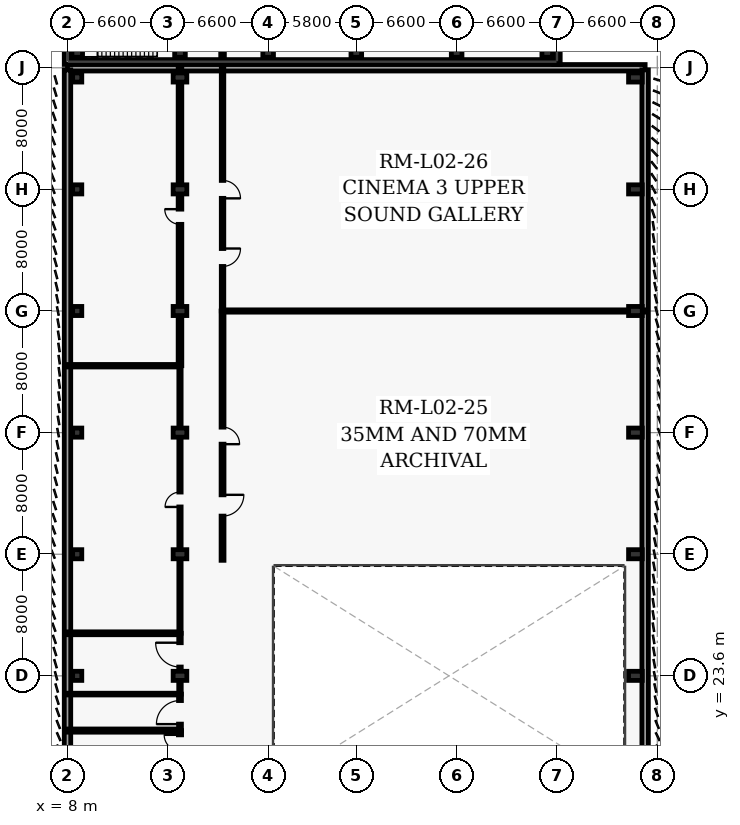
"""IFC4 building model, lengths in metres.
Left out: names, types, materials, properties, quantities, classifications, styles, units other than length and angle.
Written with IfcOpenShell. Run it as: python <this file> out.ifc"""

import sys

from ifc_helpers import new_model, si_unit, direction, frame, frame_2d, origin, origin_2d, place, context, subcontext, project, spatial, rectangle, extrude, element, fill, save


model = new_model("IFC4")
c1 = context("Model", 3, precision=1e-05, world=origin(), true_north=direction((0.0, 1.0)))
c2 = subcontext(c1, "Body", "Model", "MODEL_VIEW")
j1 = project(units=[si_unit("LENGTHUNIT", "METRE"), si_unit("PLANEANGLEUNIT", "RADIAN")], contexts=[c1])
p1 = place(None, origin())
s1 = spatial("IfcSite", under=j1, at=p1, CompositionType="ELEMENT")
p2 = place(p1, origin())
s2 = spatial("IfcBuilding", under=s1, at=p2, CompositionType="ELEMENT")
p3 = place(p2, frame((0.0, 0.0, 10.2)))
s3 = spatial("IfcBuildingStorey", under=s2, at=p3, CompositionType="ELEMENT", Elevation=10.2)
for number, where, z_axis, x_axis in (
    (1, (8.64, 23.6, 0.0), (0.0, 0.0, 1.0), (1.0, 0.0, 0.0)),
    (2, (8.64, 31.6, 0.0), (0.0, 0.0, 1.0), (1.0, 0.0, 0.0)),
    (3, (8.64, 39.6, 0.0), (0.0, 0.0, 1.0), (1.0, 0.0, 0.0)),
    (4, (8.64, 47.6, 0.0), (0.0, 0.0, 1.0), (1.0, 0.0, 0.0)),
    (5, (8.64, 55.6, 0.0), (0.0, 0.0, 1.0), (1.0, 0.0, 0.0)),
    (6, (8.64, 62.96, 0.0), (0.0, 0.0, 1.0), (1.0, 0.0, 0.0)),
):
    element("IfcColumn", number, at=place(p3, frame(where, z_axis=z_axis, x_axis=x_axis)), inside=s3, PredefinedType="COLUMN", context=c2, shape_type="SweptSolid", body=[
        extrude(rectangle(XDim=0.6, YDim=0.6, at=origin_2d()), origin(), (0.0, 0.0, 1.0), 5.4),
    ])
for number, where, z_axis, x_axis in (
    (7, (15.4, 23.6, 0.0), (0.0, 0.0, 1.0), (1.0, 0.0, 0.0)),
    (8, (15.4, 31.6, 0.0), (0.0, 0.0, 1.0), (1.0, 0.0, 0.0)),
    (9, (15.4, 39.6, 0.0), (0.0, 0.0, 1.0), (1.0, 0.0, 0.0)),
    (10, (15.4, 47.6, 0.0), (0.0, 0.0, 1.0), (1.0, 0.0, 0.0)),
    (11, (15.4, 55.6, 0.0), (0.0, 0.0, 1.0), (1.0, 0.0, 0.0)),
    (12, (15.4, 62.96, 0.0), (0.0, 0.0, 1.0), (1.0, 0.0, 0.0)),
    (13, (45.36, 23.6, 0.0), (0.0, 0.0, 1.0), (1.0, 0.0, 0.0)),
    (14, (45.36, 31.6, 0.0), (0.0, 0.0, 1.0), (1.0, 0.0, 0.0)),
    (15, (45.36, 39.6, 0.0), (0.0, 0.0, 1.0), (1.0, 0.0, 0.0)),
    (16, (45.36, 47.6, 0.0), (0.0, 0.0, 1.0), (1.0, 0.0, 0.0)),
    (17, (45.36, 55.6, 0.0), (0.0, 0.0, 1.0), (1.0, 0.0, 0.0)),
    (18, (45.36, 62.96, 0.0), (0.0, 0.0, 1.0), (1.0, 0.0, 0.0)),
):
    element("IfcColumn", number, at=place(p3, frame(where, z_axis=z_axis, x_axis=x_axis)), inside=s3, PredefinedType="COLUMN", context=c2, shape_type="SweptSolid", body=[
        extrude(rectangle(XDim=0.6, YDim=0.9, at=origin_2d()), origin(), (0.0, 0.0, 1.0), 5.4),
    ])
for number, where, z_axis, x_axis in (
    (19, (8.64, 64.64, 0.0), (0.0, 0.0, 1.0), (1.0, 0.0, 0.0)),
    (20, (15.4, 64.64, 0.0), (0.0, 0.0, 1.0), (1.0, 0.0, 0.0)),
    (21, (21.2, 64.64, 0.0), (0.0, 0.0, 1.0), (1.0, 0.0, 0.0)),
    (22, (27.0, 64.64, 0.0), (0.0, 0.0, 1.0), (1.0, 0.0, 0.0)),
    (23, (33.6, 64.64, 0.0), (0.0, 0.0, 1.0), (1.0, 0.0, 0.0)),
    (24, (39.56, 64.64, 0.0), (0.0, 0.0, 1.0), (1.0, 0.0, 0.0)),
):
    element("IfcColumn", number, at=place(p3, frame(where, z_axis=z_axis, x_axis=x_axis)), inside=s3, PredefinedType="COLUMN", context=c2, shape_type="SweptSolid", body=[
        extrude(rectangle(XDim=0.7, YDim=0.7, at=origin_2d()), origin(), (0.0, 0.0, 1.0), 5.4),
    ])
p4 = place(p3, frame((8.0, 63.6, 0.0), z_axis=(0.0, 0.0, 1.0), x_axis=(1.0, 0.0, 0.0)))
e25 = element("IfcWall", 25, at=p4, inside=s3, PredefinedType="SOLIDWALL", context=c2, shape_type="SweptSolid", body=[
    extrude(rectangle(XDim=38.0, YDim=0.425, at=frame_2d((19.0, 0.0))), origin(), (0.0, 0.0, 1.0), 5.16),
])
for number, where, z_axis, x_axis in (
    (26, (46.0, 63.46, 0.0), (0.0, 0.0, 1.0), (0.0, -1.0, 0.0)),
    (27, (8.0, 7.74, 0.0), (0.0, 0.0, 1.0), (0.0, 1.0, 0.0)),
):
    element("IfcWall", number, at=place(p3, frame(where, z_axis=z_axis, x_axis=x_axis)), inside=s3, PredefinedType="SOLIDWALL", context=c2, shape_type="SweptSolid", body=[
        extrude(rectangle(XDim=55.72, YDim=0.425, at=frame_2d((27.86, 0.0))), origin(), (0.0, 0.0, 1.0), 5.16),
    ])
p5 = place(p3, frame((40.2, 67.06, 0.0), z_axis=(0.0, 0.0, 1.0), x_axis=(0.0, -1.0, 0.0)))
e28 = element("IfcWall", 28, at=p5, inside=s3, PredefinedType="SOLIDWALL", context=c2, shape_type="SweptSolid", body=[
    extrude(rectangle(XDim=3.242, YDim=0.425, at=frame_2d((1.621, 0.0))), origin(), (0.0, 0.0, 1.0), 5.1),
])
p6 = place(p3, frame((40.2, 64.0, 0.0), z_axis=(0.0, 0.0, 1.0), x_axis=(-1.0, 0.0, 0.0)))
e29 = element("IfcWall", 29, at=p6, inside=s3, PredefinedType="SOLIDWALL", context=c2, shape_type="SweptSolid", body=[
    extrude(rectangle(XDim=32.2, YDim=0.275, at=frame_2d((16.1, 0.0))), origin(), (0.0, 0.0, 1.0), 3.7),
])
p7 = place(p3, frame((8.0, 63.818, 0.0), z_axis=(0.0, 0.0, 1.0), x_axis=(0.0, 1.0, 0.0)))
e30 = element("IfcWall", 30, at=p7, inside=s3, PredefinedType="SOLIDWALL", context=c2, shape_type="SweptSolid", body=[
    extrude(rectangle(XDim=8.042, YDim=0.425, at=frame_2d((4.021, 0.0))), origin(), (0.0, 0.0, 1.0), 5.1),
])
p8 = place(p3, frame((15.4, 64.145, 0.0), z_axis=(0.0, 0.0, 1.0), x_axis=(0.0, 1.0, 0.0)))
e31 = element("IfcWall", 31, at=p8, inside=s3, PredefinedType="SHEAR", context=c2, shape_type="SweptSolid", body=[
    extrude(rectangle(XDim=7.103, YDim=0.29, at=frame_2d((3.552, 0.0))), origin(), (0.0, 0.0, 1.0), 5.1),
])
p9 = place(p8, frame((1.105, 0.0, 0.0)))
e32 = element("IfcOpeningElement", 32, at=p9, cuts=e31, PredefinedType="OPENING", context=c2, shape_type="SweptSolid", body=[
    extrude(rectangle(XDim=1.1, YDim=2.15, at=frame_2d((0.55, 1.075))), frame((0.0, 0.155, 0.0), z_axis=(0.0, -1.0, 0.0), x_axis=(1.0, 0.0, 0.0)), (0.0, 0.0, 1.0), 0.31),
])
p10 = place(p8, frame((4.88, 0.0, 0.0)))
e33 = element("IfcOpeningElement", 33, at=p10, cuts=e31, PredefinedType="OPENING", context=c2, shape_type="SweptSolid", body=[
    extrude(rectangle(XDim=1.15, YDim=2.2, at=frame_2d((0.575, 1.1))), frame((0.0, 0.155, 0.0), z_axis=(0.0, -1.0, 0.0), x_axis=(1.0, 0.0, 0.0)), (0.0, 0.0, 1.0), 0.31),
])
p11 = place(p3, frame((15.4, 18.4, 0.0), z_axis=(0.0, 0.0, 1.0), x_axis=(0.0, 1.0, 0.0)))
e34 = element("IfcWall", 34, at=p11, inside=s3, PredefinedType="PARTITIONING", context=c2, shape_type="SweptSolid", body=[
    extrude(rectangle(XDim=1.6, YDim=0.21, at=frame_2d((0.8, 0.0))), origin(), (0.0, 0.0, 1.0), 4.31),
])
p12 = place(p11, frame((0.28, 0.0, 0.0)))
e35 = element("IfcOpeningElement", 35, at=p12, cuts=e34, PredefinedType="OPENING", context=c2, shape_type="SweptSolid", body=[
    extrude(rectangle(XDim=1.04, YDim=2.2, at=frame_2d((0.52, 1.1))), frame((0.0, 0.115, 0.0), z_axis=(0.0, -1.0, 0.0), x_axis=(1.0, 0.0, 0.0)), (0.0, 0.0, 1.0), 0.23),
])
p13 = place(p3, frame((15.4, 20.0, 0.0), z_axis=(0.0, 0.0, 1.0), x_axis=(0.0, 1.0, 0.0)))
e36 = element("IfcWall", 36, at=p13, inside=s3, PredefinedType="PARTITIONING", context=c2, shape_type="SweptSolid", body=[
    extrude(rectangle(XDim=2.4, YDim=0.19, at=frame_2d((1.2, 0.0))), origin(), (0.0, 0.0, 1.0), 4.31),
])
p14 = place(p13, frame((0.425, 0.0, 0.0)))
e37 = element("IfcOpeningElement", 37, at=p14, cuts=e36, PredefinedType="OPENING", context=c2, shape_type="SweptSolid", body=[
    extrude(rectangle(XDim=1.55, YDim=2.25, at=frame_2d((0.775, 1.125))), frame((0.0, 0.105, 0.0), z_axis=(0.0, -1.0, 0.0), x_axis=(1.0, 0.0, 0.0)), (0.0, 0.0, 1.0), 0.21),
])
p15 = place(p3, frame((15.4, 22.4, 0.0), z_axis=(0.0, 0.0, 1.0), x_axis=(0.0, 1.0, 0.0)))
e38 = element("IfcWall", 38, at=p15, inside=s3, PredefinedType="PARTITIONING", context=c2, shape_type="SweptSolid", body=[
    extrude(rectangle(XDim=4.0, YDim=0.165, at=frame_2d((2.0, 0.0))), origin(), (0.0, 0.0, 1.0), 4.31),
])
p16 = place(p15, frame((1.78, 0.0, 0.0)))
e39 = element("IfcOpeningElement", 39, at=p16, cuts=e38, PredefinedType="OPENING", context=c2, shape_type="SweptSolid", body=[
    extrude(rectangle(XDim=1.6, YDim=2.3, at=frame_2d((0.8, 1.15))), frame((0.0, 0.093, 0.0), z_axis=(0.0, -1.0, 0.0), x_axis=(1.0, 0.0, 0.0)), (0.0, 0.0, 1.0), 0.185),
])
p17 = place(p3, frame((15.4, 26.4, 0.0), z_axis=(0.0, 0.0, 1.0), x_axis=(0.0, 1.0, 0.0)))
e40 = element("IfcWall", 40, at=p17, inside=s3, PredefinedType="PARTITIONING", context=c2, shape_type="SweptSolid", body=[
    extrude(rectangle(XDim=17.6, YDim=0.15, at=frame_2d((8.8, 0.0))), origin(), (0.0, 0.0, 1.0), 4.31),
])
p18 = place(p17, frame((8.31, 0.0, 0.0)))
e41 = element("IfcOpeningElement", 41, at=p18, cuts=e40, PredefinedType="OPENING", context=c2, shape_type="SweptSolid", body=[
    extrude(rectangle(XDim=0.98, YDim=2.1, at=frame_2d((0.49, 1.05))), frame((0.0, 0.085, 0.0), z_axis=(0.0, -1.0, 0.0), x_axis=(1.0, 0.0, 0.0)), (0.0, 0.0, 1.0), 0.17),
])
p19 = place(p3, frame((15.4, 44.0, 0.0), z_axis=(0.0, 0.0, 1.0), x_axis=(0.0, 1.0, 0.0)))
e42 = element("IfcWall", 42, at=p19, inside=s3, PredefinedType="PARTITIONING", context=c2, shape_type="SweptSolid", body=[
    extrude(rectangle(XDim=19.6, YDim=0.24, at=frame_2d((9.8, 0.0))), origin(), (0.0, 0.0, 1.0), 4.31),
])
p20 = place(p19, frame((9.3, 0.0, 0.0)))
e43 = element("IfcOpeningElement", 43, at=p20, cuts=e42, PredefinedType="OPENING", context=c2, shape_type="SweptSolid", body=[
    extrude(rectangle(XDim=1.0, YDim=2.1, at=frame_2d((0.5, 1.05))), frame((0.0, 0.13, 0.0), z_axis=(0.0, -1.0, 0.0), x_axis=(1.0, 0.0, 0.0)), (0.0, 0.0, 1.0), 0.26),
])
p21 = place(p3, frame((18.2, 47.6, 0.0), z_axis=(0.0, 0.0, 1.0), x_axis=(0.0, -1.0, 0.0)))
e44 = element("IfcWall", 44, at=p21, inside=s3, PredefinedType="PARTITIONING", context=c2, shape_type="SweptSolid", body=[
    extrude(rectangle(XDim=16.4, YDim=0.19, at=frame_2d((8.2, 0.0))), origin(), (0.0, 0.0, 1.0), 5.16),
])
p22 = place(p21, frame((7.64, 0.0, 0.0)))
e45 = element("IfcOpeningElement", 45, at=p22, cuts=e44, PredefinedType="OPENING", context=c2, shape_type="SweptSolid", body=[
    extrude(rectangle(XDim=1.12, YDim=2.15, at=frame_2d((0.56, 1.075))), frame((0.0, 0.105, 0.0), z_axis=(0.0, -1.0, 0.0), x_axis=(1.0, 0.0, 0.0)), (0.0, 0.0, 1.0), 0.21),
])
p23 = place(p21, frame((12.092, 0.0, 0.0)))
e46 = element("IfcOpeningElement", 46, at=p23, cuts=e44, PredefinedType="OPENING", context=c2, shape_type="SweptSolid", body=[
    extrude(rectangle(XDim=1.4, YDim=2.25, at=frame_2d((0.7, 1.125))), frame((0.0, 0.105, 0.0), z_axis=(0.0, -1.0, 0.0), x_axis=(1.0, 0.0, 0.0)), (0.0, 0.0, 1.0), 0.21),
])
p24 = place(p3, frame((18.2, 63.6, 0.0), z_axis=(0.0, 0.0, 1.0), x_axis=(0.0, -1.0, 0.0)))
e47 = element("IfcWall", 47, at=p24, inside=s3, PredefinedType="PARTITIONING", context=c2, shape_type="SweptSolid", body=[
    extrude(rectangle(XDim=16.0, YDim=0.165, at=frame_2d((8.0, 0.0))), origin(), (0.0, 0.0, 1.0), 5.16),
])
p25 = place(p24, frame((7.41, 0.0, 0.0)))
e48 = element("IfcOpeningElement", 48, at=p25, cuts=e47, PredefinedType="OPENING", context=c2, shape_type="SweptSolid", body=[
    extrude(rectangle(XDim=1.18, YDim=2.15, at=frame_2d((0.59, 1.075))), frame((0.0, 0.093, 0.0), z_axis=(0.0, -1.0, 0.0), x_axis=(1.0, 0.0, 0.0)), (0.0, 0.0, 1.0), 0.185),
])
p26 = place(p24, frame((11.89, 0.0, 0.0)))
e49 = element("IfcOpeningElement", 49, at=p26, cuts=e47, PredefinedType="OPENING", context=c2, shape_type="SweptSolid", body=[
    extrude(rectangle(XDim=1.18, YDim=2.15, at=frame_2d((0.59, 1.075))), frame((0.0, 0.093, 0.0), z_axis=(0.0, -1.0, 0.0), x_axis=(1.0, 0.0, 0.0)), (0.0, 0.0, 1.0), 0.185),
])
p27 = place(p3, frame((8.0, 20.0, 0.0), z_axis=(0.0, 0.0, 1.0), x_axis=(1.0, 0.0, 0.0)))
e50 = element("IfcWall", 50, at=p27, inside=s3, PredefinedType="PARTITIONING", context=c2, shape_type="SweptSolid", body=[
    extrude(rectangle(XDim=7.4, YDim=0.21, at=frame_2d((3.7, 0.0))), origin(), (0.0, 0.0, 1.0), 5.16),
])
p28 = place(p3, frame((8.0, 22.4, 0.0), z_axis=(0.0, 0.0, 1.0), x_axis=(1.0, 0.0, 0.0)))
e51 = element("IfcWall", 51, at=p28, inside=s3, PredefinedType="PARTITIONING", context=c2, shape_type="SweptSolid", body=[
    extrude(rectangle(XDim=7.4, YDim=0.115, at=frame_2d((3.7, 0.0))), origin(), (0.0, 0.0, 1.0), 5.16),
])
p29 = place(p3, frame((8.0, 26.4, 0.0), z_axis=(0.0, 0.0, 1.0), x_axis=(1.0, 0.0, 0.0)))
e52 = element("IfcWall", 52, at=p29, inside=s3, PredefinedType="PARTITIONING", context=c2, shape_type="SweptSolid", body=[
    extrude(rectangle(XDim=7.4, YDim=0.19, at=frame_2d((3.7, 0.0))), origin(), (0.0, 0.0, 1.0), 5.16),
])
p30 = place(p3, frame((8.0, 44.0, 0.0), z_axis=(0.0, 0.0, 1.0), x_axis=(1.0, 0.0, 0.0)))
e53 = element("IfcWall", 53, at=p30, inside=s3, PredefinedType="PARTITIONING", context=c2, shape_type="SweptSolid", body=[
    extrude(rectangle(XDim=7.4, YDim=0.165, at=frame_2d((3.7, 0.0))), origin(), (0.0, 0.0, 1.0), 5.16),
])
p31 = place(p3, frame((18.2, 47.6, 0.0), z_axis=(0.0, 0.0, 1.0), x_axis=(1.0, 0.0, 0.0)))
e54 = element("IfcWall", 54, at=p31, inside=s3, PredefinedType="PARTITIONING", context=c2, shape_type="SweptSolid", body=[
    extrude(rectangle(XDim=27.8, YDim=0.15, at=frame_2d((13.9, 0.0))), origin(), (0.0, 0.0, 1.0), 5.16),
])
p32 = place(p3, frame((18.2, 79.6, 0.0), z_axis=(0.0, 0.0, 1.0), x_axis=(0.0, -1.0, 0.0)))
e55 = element("IfcWall", 55, at=p32, inside=s3, PredefinedType="PARTITIONING", context=c2, shape_type="SweptSolid", body=[
    extrude(rectangle(XDim=15.6, YDim=0.24, at=frame_2d((7.8, 0.0))), origin(), (0.0, 0.0, 1.0), 5.1),
])
p33 = place(p32, frame((7.15, 0.0, 0.0)))
e56 = element("IfcOpeningElement", 56, at=p33, cuts=e55, PredefinedType="OPENING", context=c2, shape_type="SweptSolid", body=[
    extrude(rectangle(XDim=1.3, YDim=2.2, at=frame_2d((0.65, 1.1))), frame((0.0, 0.13, 0.0), z_axis=(0.0, -1.0, 0.0), x_axis=(1.0, 0.0, 0.0)), (0.0, 0.0, 1.0), 0.26),
])
p34 = place(p32, frame((11.468, 0.0, 0.0)))
e57 = element("IfcOpeningElement", 57, at=p34, cuts=e55, PredefinedType="OPENING", context=c2, shape_type="SweptSolid", body=[
    extrude(rectangle(XDim=1.4, YDim=2.25, at=frame_2d((0.7, 1.125))), frame((0.0, 0.13, 0.0), z_axis=(0.0, -1.0, 0.0), x_axis=(1.0, 0.0, 0.0)), (0.0, 0.0, 1.0), 0.26),
])
p35 = place(p12, origin())
e58 = element("IfcDoor", 58, at=p35, inside=s3, OperationType="SINGLE_SWING_RIGHT", PredefinedType="DOOR", context=c2, shape_type="SweptSolid", body=[
    extrude(rectangle(XDim=1.04, YDim=2.2, at=frame_2d((0.52, 1.1))), frame((0.0, 0.025, 0.0), z_axis=(0.0, -1.0, 0.0), x_axis=(1.0, 0.0, 0.0)), (0.0, 0.0, 1.0), 0.05),
])
fill(e35, e58)
p36 = place(p14, origin())
e59 = element("IfcDoor", 59, at=p36, inside=s3, OperationType="SINGLE_SWING_LEFT", PredefinedType="DOOR", context=c2, shape_type="SweptSolid", body=[
    extrude(rectangle(XDim=1.55, YDim=2.25, at=frame_2d((0.775, 1.125))), frame((0.0, 0.025, 0.0), z_axis=(0.0, -1.0, 0.0), x_axis=(1.0, 0.0, 0.0)), (0.0, 0.0, 1.0), 0.05),
])
fill(e37, e59)
p37 = place(p16, origin())
e60 = element("IfcDoor", 60, at=p37, inside=s3, OperationType="SINGLE_SWING_RIGHT", PredefinedType="DOOR", context=c2, shape_type="SweptSolid", body=[
    extrude(rectangle(XDim=1.6, YDim=2.3, at=frame_2d((0.8, 1.15))), frame((0.0, 0.025, 0.0), z_axis=(0.0, -1.0, 0.0), x_axis=(1.0, 0.0, 0.0)), (0.0, 0.0, 1.0), 0.05),
])
fill(e39, e60)
p38 = place(p18, origin())
e61 = element("IfcDoor", 61, at=p38, inside=s3, OperationType="SINGLE_SWING_LEFT", PredefinedType="DOOR", context=c2, shape_type="SweptSolid", body=[
    extrude(rectangle(XDim=0.98, YDim=2.1, at=frame_2d((0.49, 1.05))), frame((0.0, 0.025, 0.0), z_axis=(0.0, -1.0, 0.0), x_axis=(1.0, 0.0, 0.0)), (0.0, 0.0, 1.0), 0.05),
])
fill(e41, e61)
p39 = place(p20, origin())
e62 = element("IfcDoor", 62, at=p39, inside=s3, OperationType="SINGLE_SWING_RIGHT", PredefinedType="DOOR", context=c2, shape_type="SweptSolid", body=[
    extrude(rectangle(XDim=1.0, YDim=2.1, at=frame_2d((0.5, 1.05))), frame((0.0, 0.025, 0.0), z_axis=(0.0, -1.0, 0.0), x_axis=(1.0, 0.0, 0.0)), (0.0, 0.0, 1.0), 0.05),
])
fill(e43, e62)
p40 = place(p22, origin())
e63 = element("IfcDoor", 63, at=p40, inside=s3, OperationType="SINGLE_SWING_RIGHT", PredefinedType="DOOR", context=c2, shape_type="SweptSolid", body=[
    extrude(rectangle(XDim=1.12, YDim=2.15, at=frame_2d((0.56, 1.075))), frame((0.0, 0.025, 0.0), z_axis=(0.0, -1.0, 0.0), x_axis=(1.0, 0.0, 0.0)), (0.0, 0.0, 1.0), 0.05),
])
fill(e45, e63)
p41 = place(p23, origin())
e64 = element("IfcDoor", 64, at=p41, inside=s3, OperationType="SINGLE_SWING_LEFT", PredefinedType="DOOR", context=c2, shape_type="SweptSolid", body=[
    extrude(rectangle(XDim=1.4, YDim=2.25, at=frame_2d((0.7, 1.125))), frame((0.0, 0.025, 0.0), z_axis=(0.0, -1.0, 0.0), x_axis=(1.0, 0.0, 0.0)), (0.0, 0.0, 1.0), 0.05),
])
fill(e46, e64)
p42 = place(p25, origin())
e65 = element("IfcDoor", 65, at=p42, inside=s3, OperationType="SINGLE_SWING_RIGHT", PredefinedType="DOOR", context=c2, shape_type="SweptSolid", body=[
    extrude(rectangle(XDim=1.18, YDim=2.15, at=frame_2d((0.59, 1.075))), frame((0.0, 0.025, 0.0), z_axis=(0.0, -1.0, 0.0), x_axis=(1.0, 0.0, 0.0)), (0.0, 0.0, 1.0), 0.05),
])
fill(e48, e65)
p43 = place(p26, origin())
e66 = element("IfcDoor", 66, at=p43, inside=s3, OperationType="SINGLE_SWING_LEFT", PredefinedType="DOOR", context=c2, shape_type="SweptSolid", body=[
    extrude(rectangle(XDim=1.18, YDim=2.15, at=frame_2d((0.59, 1.075))), frame((0.0, 0.025, 0.0), z_axis=(0.0, -1.0, 0.0), x_axis=(1.0, 0.0, 0.0)), (0.0, 0.0, 1.0), 0.05),
])
fill(e49, e66)
save(model, sys.argv[1])
